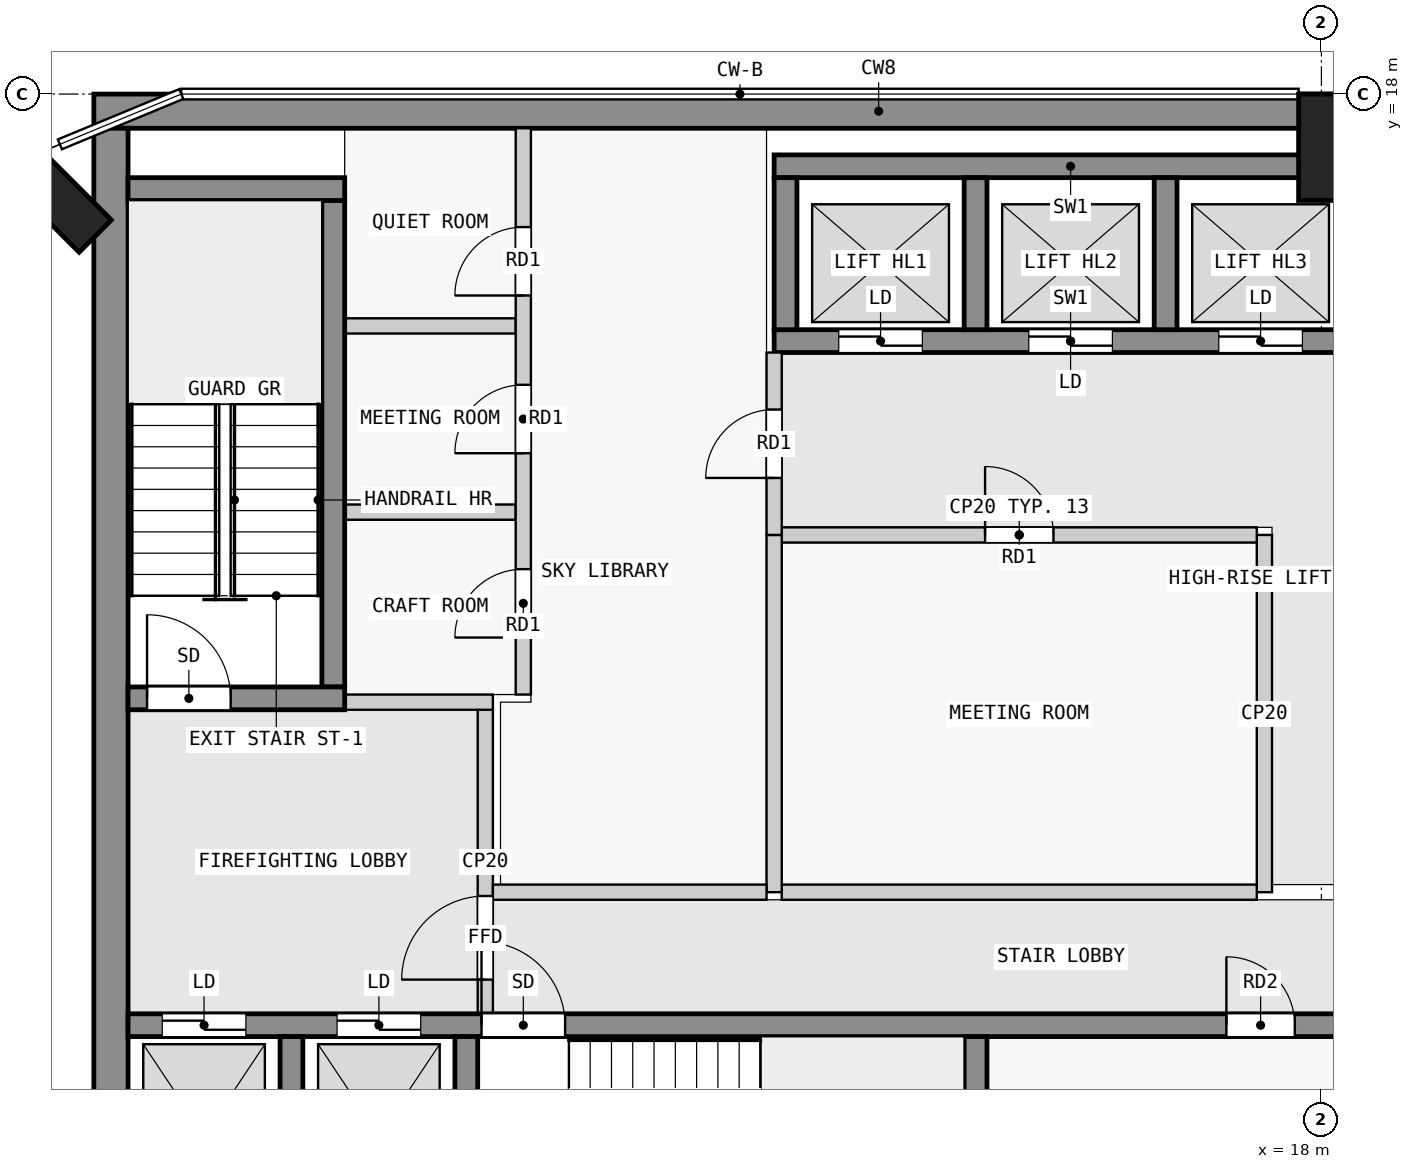
"""IFC4 building model, lengths in metres.
Left out: names, types, materials, properties, quantities, classifications, styles, units other than length and angle.
Written with IfcOpenShell. Run it as: python <this file> out.ifc"""

import sys

from ifc_helpers import new_model, si_unit, direction, frame, frame_2d, origin, origin_2d, place, context, subcontext, project, spatial, rectangle, extrude, element, fill, save


model = new_model("IFC4")
c1 = context("Model", 3, precision=1e-05, world=origin(), true_north=direction((0.0, 1.0)))
c2 = subcontext(c1, "Body", "Model", "MODEL_VIEW")
j1 = project(units=[si_unit("LENGTHUNIT", "METRE"), si_unit("PLANEANGLEUNIT", "RADIAN")], contexts=[c1])
p1 = place(None, origin())
s1 = spatial("IfcSite", under=j1, at=p1, CompositionType="ELEMENT")
p2 = place(p1, origin())
s2 = spatial("IfcBuilding", under=s1, at=p2, CompositionType="ELEMENT")
p3 = place(p2, frame((0.0, 0.0, 284.4)))
s3 = spatial("IfcBuildingStorey", under=s2, at=p3, CompositionType="ELEMENT", Elevation=284.4)
for number, where, z_axis, x_axis in (
    (1, (18.0, 17.3, 0.0), (0.0, 0.0, 1.0), (1.0, 0.0, 0.0)),
    (2, (1.374, 16.626, 0.0), (0.0, 0.0, 1.0), (0.707, 0.707, 0.0)),
):
    element("IfcColumn", number, at=place(p3, frame(where, z_axis=z_axis, x_axis=x_axis)), inside=s3, PredefinedType="COLUMN", context=c2, shape_type="SweptSolid", body=[
        extrude(rectangle(XDim=0.6, YDim=1.4, at=origin_2d()), origin(), (0.0, 0.0, 1.0), 3.5),
    ])
p4 = place(p3, frame((1.85, 17.775, 0.0), z_axis=(0.0, 0.0, 1.0), x_axis=(1.0, 0.0, 0.0)))
e3 = element("IfcWall", 3, at=p4, inside=s3, PredefinedType="SHEAR", context=c2, shape_type="SweptSolid", body=[
    extrude(rectangle(XDim=20.65, YDim=0.45, at=frame_2d((10.325, 0.0))), origin(), (0.0, 0.0, 1.0), 3.05),
])
p5 = place(p3, frame((2.075, 2.5, 0.0), z_axis=(0.0, 0.0, 1.0), x_axis=(0.0, 1.0, 0.0)))
e4 = element("IfcWall", 4, at=p5, inside=s3, PredefinedType="SHEAR", context=c2, shape_type="SweptSolid", body=[
    extrude(rectangle(XDim=15.05, YDim=0.45, at=frame_2d((7.525, 0.0))), origin(), (0.0, 0.0, 1.0), 3.05),
])
for number, where, z_axis, x_axis in (
    (5, (4.45, 2.8, 0.0), (0.0, 0.0, 1.0), (0.0, 1.0, 0.0)),
    (6, (6.75, 2.8, 0.0), (0.0, 0.0, 1.0), (0.0, 1.0, 0.0)),
    (7, (13.45, 2.8, 0.0), (0.0, 0.0, 1.0), (0.0, 1.0, 0.0)),
):
    element("IfcWall", number, at=place(p3, frame(where, z_axis=z_axis, x_axis=x_axis)), inside=s3, PredefinedType="SHEAR", context=c2, shape_type="SweptSolid", body=[
        extrude(rectangle(XDim=2.8, YDim=0.3, at=frame_2d((1.4, 0.0))), origin(), (0.0, 0.0, 1.0), 3.05),
    ])
p6 = place(p3, frame((2.3, 5.75, 0.0), z_axis=(0.0, 0.0, 1.0), x_axis=(1.0, 0.0, 0.0)))
e8 = element("IfcWall", 8, at=p6, inside=s3, PredefinedType="SHEAR", context=c2, shape_type="SweptSolid", body=[
    extrude(rectangle(XDim=18.8, YDim=0.3, at=frame_2d((9.4, 0.0))), origin(), (0.0, 0.0, 1.0), 3.05),
])
p7 = place(p6, frame((4.65, 0.0, 0.0)))
e9 = element("IfcOpeningElement", 9, at=p7, cuts=e8, PredefinedType="OPENING", context=c2, shape_type="SweptSolid", body=[
    extrude(rectangle(XDim=1.1, YDim=2.1, at=frame_2d((0.55, 1.05))), frame((0.0, 0.16, 0.0), z_axis=(0.0, -1.0, 0.0), x_axis=(1.0, 0.0, 0.0)), (0.0, 0.0, 1.0), 0.32),
])
p8 = place(p6, frame((0.45, 0.0, 0.0)))
e10 = element("IfcOpeningElement", 10, at=p8, cuts=e8, PredefinedType="OPENING", context=c2, shape_type="SweptSolid", body=[
    extrude(rectangle(XDim=1.1, YDim=2.1, at=frame_2d((0.55, 1.05))), frame((0.0, 0.16, 0.0), z_axis=(0.0, -1.0, 0.0), x_axis=(1.0, 0.0, 0.0)), (0.0, 0.0, 1.0), 0.32),
])
p9 = place(p6, frame((2.75, 0.0, 0.0)))
e11 = element("IfcOpeningElement", 11, at=p9, cuts=e8, PredefinedType="OPENING", context=c2, shape_type="SweptSolid", body=[
    extrude(rectangle(XDim=1.1, YDim=2.1, at=frame_2d((0.55, 1.05))), frame((0.0, 0.16, 0.0), z_axis=(0.0, -1.0, 0.0), x_axis=(1.0, 0.0, 0.0)), (0.0, 0.0, 1.0), 0.32),
])
p10 = place(p6, frame((14.45, 0.0, 0.0)))
e12 = element("IfcOpeningElement", 12, at=p10, cuts=e8, PredefinedType="OPENING", context=c2, shape_type="SweptSolid", body=[
    extrude(rectangle(XDim=0.9, YDim=2.1, at=frame_2d((0.45, 1.05))), frame((0.0, 0.16, 0.0), z_axis=(0.0, -1.0, 0.0), x_axis=(1.0, 0.0, 0.0)), (0.0, 0.0, 1.0), 0.32),
])
p11 = place(p3, frame((2.3, 10.05, 0.0), z_axis=(0.0, 0.0, 1.0), x_axis=(1.0, 0.0, 0.0)))
e13 = element("IfcWall", 13, at=p11, inside=s3, PredefinedType="SHEAR", context=c2, shape_type="SweptSolid", body=[
    extrude(rectangle(XDim=2.85, YDim=0.3, at=frame_2d((1.425, 0.0))), origin(), (0.0, 0.0, 1.0), 3.05),
])
p12 = place(p11, frame((0.25, 0.0, 0.0)))
e14 = element("IfcOpeningElement", 14, at=p12, cuts=e13, PredefinedType="OPENING", context=c2, shape_type="SweptSolid", body=[
    extrude(rectangle(XDim=1.1, YDim=2.1, at=frame_2d((0.55, 1.05))), frame((0.0, 0.16, 0.0), z_axis=(0.0, -1.0, 0.0), x_axis=(1.0, 0.0, 0.0)), (0.0, 0.0, 1.0), 0.32),
])
p13 = place(p3, frame((5.0, 10.2, 0.0), z_axis=(0.0, 0.0, 1.0), x_axis=(0.0, 1.0, 0.0)))
e15 = element("IfcWall", 15, at=p13, inside=s3, PredefinedType="SHEAR", context=c2, shape_type="SweptSolid", body=[
    extrude(rectangle(XDim=6.4, YDim=0.3, at=frame_2d((3.2, 0.0))), origin(), (0.0, 0.0, 1.0), 3.05),
])
p14 = place(p3, frame((2.3, 16.75, 0.0), z_axis=(0.0, 0.0, 1.0), x_axis=(1.0, 0.0, 0.0)))
e16 = element("IfcWall", 16, at=p14, inside=s3, PredefinedType="SHEAR", context=c2, shape_type="SweptSolid", body=[
    extrude(rectangle(XDim=2.85, YDim=0.3, at=frame_2d((1.425, 0.0))), origin(), (0.0, 0.0, 1.0), 3.05),
])
p15 = place(p3, frame((10.8, 17.05, 0.0), z_axis=(0.0, 0.0, 1.0), x_axis=(1.0, 0.0, 0.0)))
e17 = element("IfcWall", 17, at=p15, inside=s3, PredefinedType="SHEAR", context=c2, shape_type="SweptSolid", body=[
    extrude(rectangle(XDim=7.8, YDim=0.3, at=frame_2d((3.9, 0.0))), origin(), (0.0, 0.0, 1.0), 3.05),
])
p16 = place(p3, frame((10.8, 14.75, 0.0), z_axis=(0.0, 0.0, 1.0), x_axis=(1.0, 0.0, 0.0)))
e18 = element("IfcWall", 18, at=p16, inside=s3, PredefinedType="SHEAR", context=c2, shape_type="SweptSolid", body=[
    extrude(rectangle(XDim=7.8, YDim=0.3, at=frame_2d((3.9, 0.0))), origin(), (0.0, 0.0, 1.0), 3.05),
])
p17 = place(p16, frame((0.85, 0.0, 0.0)))
e19 = element("IfcOpeningElement", 19, at=p17, cuts=e18, PredefinedType="OPENING", context=c2, shape_type="SweptSolid", body=[
    extrude(rectangle(XDim=1.1, YDim=2.1, at=frame_2d((0.55, 1.05))), frame((0.0, 0.16, 0.0), z_axis=(0.0, -1.0, 0.0), x_axis=(1.0, 0.0, 0.0)), (0.0, 0.0, 1.0), 0.32),
])
p18 = place(p16, frame((3.35, 0.0, 0.0)))
e20 = element("IfcOpeningElement", 20, at=p18, cuts=e18, PredefinedType="OPENING", context=c2, shape_type="SweptSolid", body=[
    extrude(rectangle(XDim=1.1, YDim=2.1, at=frame_2d((0.55, 1.05))), frame((0.0, 0.16, 0.0), z_axis=(0.0, -1.0, 0.0), x_axis=(1.0, 0.0, 0.0)), (0.0, 0.0, 1.0), 0.32),
])
p19 = place(p16, frame((5.85, 0.0, 0.0)))
e21 = element("IfcOpeningElement", 21, at=p19, cuts=e18, PredefinedType="OPENING", context=c2, shape_type="SweptSolid", body=[
    extrude(rectangle(XDim=1.1, YDim=2.1, at=frame_2d((0.55, 1.05))), frame((0.0, 0.16, 0.0), z_axis=(0.0, -1.0, 0.0), x_axis=(1.0, 0.0, 0.0)), (0.0, 0.0, 1.0), 0.32),
])
for number, where, z_axis, x_axis in (
    (22, (10.95, 14.9, 0.0), (0.0, 0.0, 1.0), (0.0, 1.0, 0.0)),
    (23, (13.45, 14.9, 0.0), (0.0, 0.0, 1.0), (0.0, 1.0, 0.0)),
    (24, (15.95, 14.9, 0.0), (0.0, 0.0, 1.0), (0.0, 1.0, 0.0)),
):
    element("IfcWall", number, at=place(p3, frame(where, z_axis=z_axis, x_axis=x_axis)), inside=s3, PredefinedType="SHEAR", context=c2, shape_type="SweptSolid", body=[
        extrude(rectangle(XDim=2.0, YDim=0.3, at=frame_2d((1.0, 0.0))), origin(), (0.0, 0.0, 1.0), 3.05),
    ])
p20 = place(p3, frame((7.0, 5.9, 0.0), z_axis=(0.0, 0.0, 1.0), x_axis=(0.0, 1.0, 0.0)))
e25 = element("IfcWall", 25, at=p20, inside=s3, PredefinedType="PARTITIONING", context=c2, shape_type="SweptSolid", body=[
    extrude(rectangle(XDim=4.0, YDim=0.2, at=frame_2d((2.0, 0.0))), origin(), (0.0, 0.0, 1.0), 3.05),
])
p21 = place(p20, frame((0.45, 0.0, 0.0)))
e26 = element("IfcOpeningElement", 26, at=p21, cuts=e25, PredefinedType="OPENING", context=c2, shape_type="SweptSolid", body=[
    extrude(rectangle(XDim=1.1, YDim=2.1, at=frame_2d((0.55, 1.05))), frame((0.0, 0.11, 0.0), z_axis=(0.0, -1.0, 0.0), x_axis=(1.0, 0.0, 0.0)), (0.0, 0.0, 1.0), 0.22),
])
p22 = place(p3, frame((5.15, 10.0, 0.0), z_axis=(0.0, 0.0, 1.0), x_axis=(1.0, 0.0, 0.0)))
e27 = element("IfcWall", 27, at=p22, inside=s3, PredefinedType="PARTITIONING", context=c2, shape_type="SweptSolid", body=[
    extrude(rectangle(XDim=1.95, YDim=0.2, at=frame_2d((0.975, 0.0))), origin(), (0.0, 0.0, 1.0), 3.05),
])
p23 = place(p3, frame((7.1, 7.5, 0.0), z_axis=(0.0, 0.0, 1.0), x_axis=(1.0, 0.0, 0.0)))
e28 = element("IfcWall", 28, at=p23, inside=s3, PredefinedType="PARTITIONING", context=c2, shape_type="SweptSolid", body=[
    extrude(rectangle(XDim=3.6, YDim=0.2, at=frame_2d((1.8, 0.0))), origin(), (0.0, 0.0, 1.0), 3.05),
])
p24 = place(p3, frame((10.8, 12.2, 0.0), z_axis=(0.0, 0.0, 1.0), x_axis=(0.0, 1.0, 0.0)))
e29 = element("IfcWall", 29, at=p24, inside=s3, PredefinedType="PARTITIONING", context=c2, shape_type="SweptSolid", body=[
    extrude(rectangle(XDim=2.4, YDim=0.2, at=frame_2d((1.2, 0.0))), origin(), (0.0, 0.0, 1.0), 3.05),
])
p25 = place(p24, frame((0.75, 0.0, 0.0)))
e30 = element("IfcOpeningElement", 30, at=p25, cuts=e29, PredefinedType="OPENING", context=c2, shape_type="SweptSolid", body=[
    extrude(rectangle(XDim=0.9, YDim=2.1, at=frame_2d((0.45, 1.05))), frame((0.0, 0.11, 0.0), z_axis=(0.0, -1.0, 0.0), x_axis=(1.0, 0.0, 0.0)), (0.0, 0.0, 1.0), 0.22),
])
p26 = place(p3, frame((10.8, 7.5, 0.0), z_axis=(0.0, 0.0, 1.0), x_axis=(0.0, 1.0, 0.0)))
e31 = element("IfcWall", 31, at=p26, inside=s3, PredefinedType="PARTITIONING", context=c2, shape_type="SweptSolid", body=[
    extrude(rectangle(XDim=4.7, YDim=0.2, at=frame_2d((2.35, 0.0))), origin(), (0.0, 0.0, 1.0), 3.05),
])
p27 = place(p3, frame((10.9, 7.5, 0.0), z_axis=(0.0, 0.0, 1.0), x_axis=(1.0, 0.0, 0.0)))
e32 = element("IfcWall", 32, at=p27, inside=s3, PredefinedType="PARTITIONING", context=c2, shape_type="SweptSolid", body=[
    extrude(rectangle(XDim=6.25, YDim=0.2, at=frame_2d((3.125, 0.0))), origin(), (0.0, 0.0, 1.0), 3.05),
])
p28 = place(p3, frame((17.25, 7.5, 0.0), z_axis=(0.0, 0.0, 1.0), x_axis=(0.0, 1.0, 0.0)))
e33 = element("IfcWall", 33, at=p28, inside=s3, PredefinedType="PARTITIONING", context=c2, shape_type="SweptSolid", body=[
    extrude(rectangle(XDim=4.7, YDim=0.2, at=frame_2d((2.35, 0.0))), origin(), (0.0, 0.0, 1.0), 3.05),
])
p29 = place(p3, frame((10.9, 12.2, 0.0), z_axis=(0.0, 0.0, 1.0), x_axis=(1.0, 0.0, 0.0)))
e34 = element("IfcWall", 34, at=p29, inside=s3, PredefinedType="PARTITIONING", context=c2, shape_type="SweptSolid", body=[
    extrude(rectangle(XDim=6.25, YDim=0.2, at=frame_2d((3.125, 0.0))), origin(), (0.0, 0.0, 1.0), 3.05),
])
p30 = place(p29, frame((2.675, 0.0, 0.0)))
e35 = element("IfcOpeningElement", 35, at=p30, cuts=e34, PredefinedType="OPENING", context=c2, shape_type="SweptSolid", body=[
    extrude(rectangle(XDim=0.9, YDim=2.1, at=frame_2d((0.45, 1.05))), frame((0.0, 0.11, 0.0), z_axis=(0.0, -1.0, 0.0), x_axis=(1.0, 0.0, 0.0)), (0.0, 0.0, 1.0), 0.22),
])
p31 = place(p3, frame((7.5, 10.1, 0.0), z_axis=(0.0, 0.0, 1.0), x_axis=(0.0, 1.0, 0.0)))
e36 = element("IfcWall", 36, at=p31, inside=s3, PredefinedType="PARTITIONING", context=c2, shape_type="SweptSolid", body=[
    extrude(rectangle(XDim=7.45, YDim=0.2, at=frame_2d((3.725, 0.0))), origin(), (0.0, 0.0, 1.0), 3.05),
])
p32 = place(p31, frame((0.75, 0.0, 0.0)))
e37 = element("IfcOpeningElement", 37, at=p32, cuts=e36, PredefinedType="OPENING", context=c2, shape_type="SweptSolid", body=[
    extrude(rectangle(XDim=0.9, YDim=2.1, at=frame_2d((0.45, 1.05))), frame((0.0, 0.11, 0.0), z_axis=(0.0, -1.0, 0.0), x_axis=(1.0, 0.0, 0.0)), (0.0, 0.0, 1.0), 0.22),
])
p33 = place(p31, frame((3.175, 0.0, 0.0)))
e38 = element("IfcOpeningElement", 38, at=p33, cuts=e36, PredefinedType="OPENING", context=c2, shape_type="SweptSolid", body=[
    extrude(rectangle(XDim=0.9, YDim=2.1, at=frame_2d((0.45, 1.05))), frame((0.0, 0.11, 0.0), z_axis=(0.0, -1.0, 0.0), x_axis=(1.0, 0.0, 0.0)), (0.0, 0.0, 1.0), 0.22),
])
p34 = place(p31, frame((5.25, 0.0, 0.0)))
e39 = element("IfcOpeningElement", 39, at=p34, cuts=e36, PredefinedType="OPENING", context=c2, shape_type="SweptSolid", body=[
    extrude(rectangle(XDim=0.9, YDim=2.1, at=frame_2d((0.45, 1.05))), frame((0.0, 0.11, 0.0), z_axis=(0.0, -1.0, 0.0), x_axis=(1.0, 0.0, 0.0)), (0.0, 0.0, 1.0), 0.22),
])
for number, where, z_axis, x_axis in (
    (40, (5.15, 12.5, 0.0), (0.0, 0.0, 1.0), (1.0, 0.0, 0.0)),
    (41, (5.15, 14.95, 0.0), (0.0, 0.0, 1.0), (1.0, 0.0, 0.0)),
):
    element("IfcWall", number, at=place(p3, frame(where, z_axis=z_axis, x_axis=x_axis)), inside=s3, PredefinedType="PARTITIONING", context=c2, shape_type="SweptSolid", body=[
        extrude(rectangle(XDim=2.25, YDim=0.2, at=frame_2d((1.125, 0.0))), origin(), (0.0, 0.0, 1.0), 3.05),
    ])
p35 = place(p21, origin())
e42 = element("IfcDoor", 42, at=p35, inside=s3, OperationType="SINGLE_SWING_LEFT", PredefinedType="DOOR", context=c2, shape_type="SweptSolid", body=[
    extrude(rectangle(XDim=1.1, YDim=2.1, at=frame_2d((0.55, 1.05))), frame((0.0, 0.025, 0.0), z_axis=(0.0, -1.0, 0.0), x_axis=(1.0, 0.0, 0.0)), (0.0, 0.0, 1.0), 0.05),
])
fill(e26, e42)
p36 = place(p12, origin())
e43 = element("IfcDoor", 43, at=p36, inside=s3, OperationType="SINGLE_SWING_RIGHT", PredefinedType="DOOR", context=c2, shape_type="SweptSolid", body=[
    extrude(rectangle(XDim=1.1, YDim=2.1, at=frame_2d((0.55, 1.05))), frame((0.0, 0.025, 0.0), z_axis=(0.0, -1.0, 0.0), x_axis=(1.0, 0.0, 0.0)), (0.0, 0.0, 1.0), 0.05),
])
fill(e14, e43)
p37 = place(p25, origin())
e44 = element("IfcDoor", 44, at=p37, inside=s3, OperationType="SINGLE_SWING_LEFT", PredefinedType="DOOR", context=c2, shape_type="SweptSolid", body=[
    extrude(rectangle(XDim=0.9, YDim=2.1, at=frame_2d((0.45, 1.05))), frame((0.0, 0.025, 0.0), z_axis=(0.0, -1.0, 0.0), x_axis=(1.0, 0.0, 0.0)), (0.0, 0.0, 1.0), 0.05),
])
fill(e30, e44)
p38 = place(p30, origin())
e45 = element("IfcDoor", 45, at=p38, inside=s3, OperationType="SINGLE_SWING_LEFT", PredefinedType="DOOR", context=c2, shape_type="SweptSolid", body=[
    extrude(rectangle(XDim=0.9, YDim=2.1, at=frame_2d((0.45, 1.05))), frame((0.0, 0.025, 0.0), z_axis=(0.0, -1.0, 0.0), x_axis=(1.0, 0.0, 0.0)), (0.0, 0.0, 1.0), 0.05),
])
fill(e35, e45)
p39 = place(p7, origin())
e46 = element("IfcDoor", 46, at=p39, inside=s3, OperationType="SINGLE_SWING_LEFT", PredefinedType="DOOR", context=c2, shape_type="SweptSolid", body=[
    extrude(rectangle(XDim=1.1, YDim=2.1, at=frame_2d((0.55, 1.05))), frame((0.0, 0.025, 0.0), z_axis=(0.0, -1.0, 0.0), x_axis=(1.0, 0.0, 0.0)), (0.0, 0.0, 1.0), 0.05),
])
fill(e9, e46)
p40 = place(p8, origin())
e47 = element("IfcDoor", 47, at=p40, inside=s3, OperationType="DOUBLE_DOOR_SLIDING", PredefinedType="DOOR", context=c2, shape_type="SweptSolid", body=[
    extrude(rectangle(XDim=1.1, YDim=2.1, at=frame_2d((0.55, 1.05))), frame((0.0, 0.025, 0.0), z_axis=(0.0, -1.0, 0.0), x_axis=(1.0, 0.0, 0.0)), (0.0, 0.0, 1.0), 0.05),
])
fill(e10, e47)
p41 = place(p9, origin())
e48 = element("IfcDoor", 48, at=p41, inside=s3, OperationType="DOUBLE_DOOR_SLIDING", PredefinedType="DOOR", context=c2, shape_type="SweptSolid", body=[
    extrude(rectangle(XDim=1.1, YDim=2.1, at=frame_2d((0.55, 1.05))), frame((0.0, 0.025, 0.0), z_axis=(0.0, -1.0, 0.0), x_axis=(1.0, 0.0, 0.0)), (0.0, 0.0, 1.0), 0.05),
])
fill(e11, e48)
p42 = place(p17, origin())
e49 = element("IfcDoor", 49, at=p42, inside=s3, OperationType="DOUBLE_DOOR_SLIDING", PredefinedType="DOOR", context=c2, shape_type="SweptSolid", body=[
    extrude(rectangle(XDim=1.1, YDim=2.1, at=frame_2d((0.55, 1.05))), frame((0.0, 0.025, 0.0), z_axis=(0.0, -1.0, 0.0), x_axis=(1.0, 0.0, 0.0)), (0.0, 0.0, 1.0), 0.05),
])
fill(e19, e49)
p43 = place(p18, origin())
e50 = element("IfcDoor", 50, at=p43, inside=s3, OperationType="DOUBLE_DOOR_SLIDING", PredefinedType="DOOR", context=c2, shape_type="SweptSolid", body=[
    extrude(rectangle(XDim=1.1, YDim=2.1, at=frame_2d((0.55, 1.05))), frame((0.0, 0.025, 0.0), z_axis=(0.0, -1.0, 0.0), x_axis=(1.0, 0.0, 0.0)), (0.0, 0.0, 1.0), 0.05),
])
fill(e20, e50)
p44 = place(p19, origin())
e51 = element("IfcDoor", 51, at=p44, inside=s3, OperationType="DOUBLE_DOOR_SLIDING", PredefinedType="DOOR", context=c2, shape_type="SweptSolid", body=[
    extrude(rectangle(XDim=1.1, YDim=2.1, at=frame_2d((0.55, 1.05))), frame((0.0, 0.025, 0.0), z_axis=(0.0, -1.0, 0.0), x_axis=(1.0, 0.0, 0.0)), (0.0, 0.0, 1.0), 0.05),
])
fill(e21, e51)
p45 = place(p32, origin())
e52 = element("IfcDoor", 52, at=p45, inside=s3, OperationType="SINGLE_SWING_RIGHT", PredefinedType="DOOR", context=c2, shape_type="SweptSolid", body=[
    extrude(rectangle(XDim=0.9, YDim=2.1, at=frame_2d((0.45, 1.05))), frame((0.0, 0.025, 0.0), z_axis=(0.0, -1.0, 0.0), x_axis=(1.0, 0.0, 0.0)), (0.0, 0.0, 1.0), 0.05),
])
fill(e37, e52)
p46 = place(p33, origin())
e53 = element("IfcDoor", 53, at=p46, inside=s3, OperationType="SINGLE_SWING_RIGHT", PredefinedType="DOOR", context=c2, shape_type="SweptSolid", body=[
    extrude(rectangle(XDim=0.9, YDim=2.1, at=frame_2d((0.45, 1.05))), frame((0.0, 0.025, 0.0), z_axis=(0.0, -1.0, 0.0), x_axis=(1.0, 0.0, 0.0)), (0.0, 0.0, 1.0), 0.05),
])
fill(e38, e53)
p47 = place(p34, origin())
e54 = element("IfcDoor", 54, at=p47, inside=s3, OperationType="SINGLE_SWING_RIGHT", PredefinedType="DOOR", context=c2, shape_type="SweptSolid", body=[
    extrude(rectangle(XDim=0.9, YDim=2.1, at=frame_2d((0.45, 1.05))), frame((0.0, 0.025, 0.0), z_axis=(0.0, -1.0, 0.0), x_axis=(1.0, 0.0, 0.0)), (0.0, 0.0, 1.0), 0.05),
])
fill(e39, e54)
p48 = place(p10, origin())
e55 = element("IfcDoor", 55, at=p48, inside=s3, OperationType="SINGLE_SWING_LEFT", PredefinedType="DOOR", context=c2, shape_type="SweptSolid", body=[
    extrude(rectangle(XDim=0.9, YDim=2.1, at=frame_2d((0.45, 1.05))), frame((0.0, 0.025, 0.0), z_axis=(0.0, -1.0, 0.0), x_axis=(1.0, 0.0, 0.0)), (0.0, 0.0, 1.0), 0.05),
])
fill(e12, e55)
save(model, sys.argv[1])
